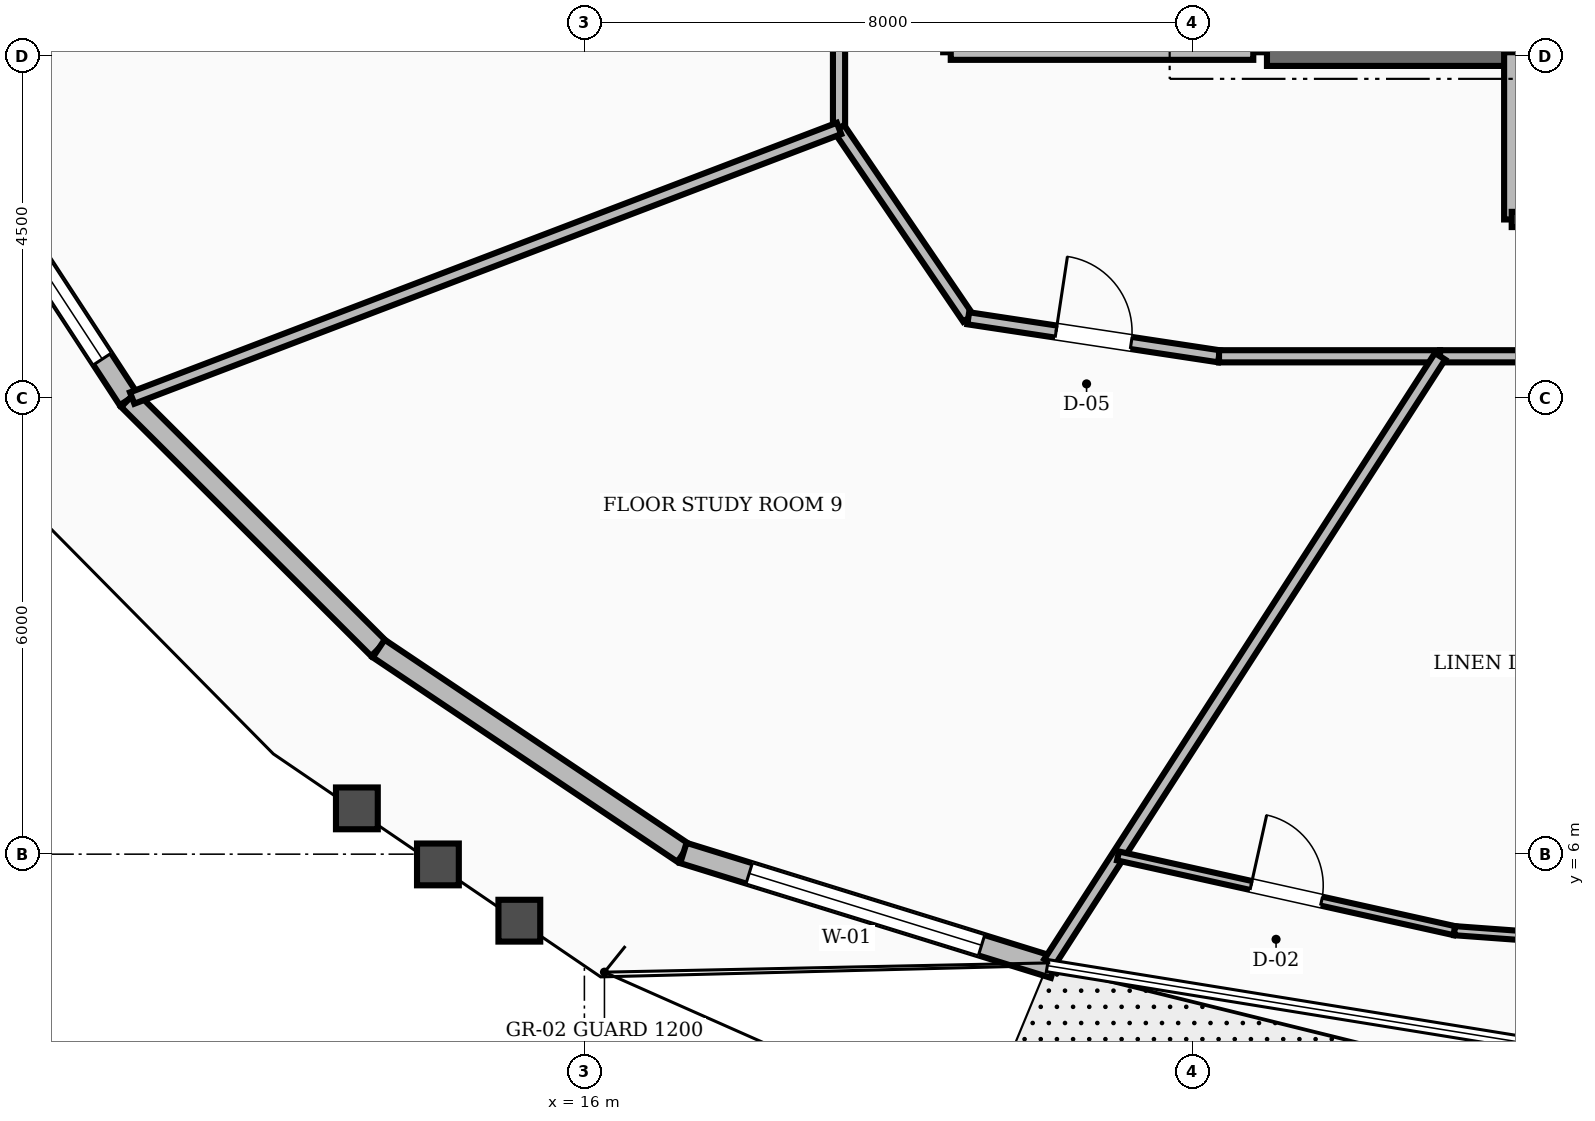
"""IFC4 building model, lengths in metres.
Left out: names, types, materials, properties, quantities, classifications, styles, units other than length and angle.
Written with IfcOpenShell. Run it as: python <this file> out.ifc"""

import sys

from ifc_helpers import new_model, si_unit, direction, frame, frame_2d, origin, place, context, subcontext, project, spatial, rectangle, extrude, element, fill, save


model = new_model("IFC4")
c1 = context("Model", 3, precision=1e-05, world=origin(), true_north=direction((0.0, 1.0)))
c2 = subcontext(c1, "Body", "Model", "MODEL_VIEW")
j1 = project(units=[si_unit("LENGTHUNIT", "METRE"), si_unit("PLANEANGLEUNIT", "RADIAN")], contexts=[c1])
p1 = place(None, origin())
s1 = spatial("IfcSite", under=j1, at=p1, CompositionType="ELEMENT")
p2 = place(p1, origin())
s2 = spatial("IfcBuilding", under=s1, at=p2, CompositionType="ELEMENT")
p3 = place(p2, frame((0.0, 0.0, 142.4)))
s3 = spatial("IfcBuildingStorey", under=s2, at=p3, CompositionType="ELEMENT", Elevation=142.4)
p4 = place(p3, frame((24.98, 16.55, 0.0), z_axis=(0.0, 0.0, 1.0), x_axis=(1.0, 0.0, 0.0)))
e1 = element("IfcWall", 1, at=p4, inside=s3, PredefinedType="SHEAR", context=c2, shape_type="SweptSolid", body=[
    extrude(rectangle(XDim=3.22, YDim=0.36, at=frame_2d((1.61, 0.0))), origin(), (0.0, 0.0, 1.0), 3.6),
])
p5 = place(p3, frame((7.559, 15.722, 0.0), z_axis=(0.0, 0.0, 1.0), x_axis=(0.547212555107, -0.836993679506, 0.0)))
e2 = element("IfcWall", 2, at=p5, inside=s3, PredefinedType="STANDARD", context=c2, shape_type="SweptSolid", body=[
    extrude(rectangle(XDim=4.468, YDim=0.28, at=frame_2d((2.234, 0.0))), origin(), (0.0, 0.0, 1.0), 2.82),
])
p6 = place(p5, frame((0.634, 0.0, 0.8)))
e3 = element("IfcOpeningElement", 3, at=p6, cuts=e2, PredefinedType="OPENING", context=c2, shape_type="SweptSolid", body=[
    extrude(rectangle(XDim=3.2, YDim=1.65, at=frame_2d((1.6, 0.825))), frame((0.0, 0.15, 0.0), z_axis=(0.0, -1.0, 0.0), x_axis=(1.0, 0.0, 0.0)), (0.0, 0.0, 1.0), 0.3),
])
p7 = place(p3, frame((10.004, 11.983, 0.0), z_axis=(0.0, 0.0, 1.0), x_axis=(0.708393596514, -0.705817619799, 0.0)))
e4 = element("IfcWall", 4, at=p7, inside=s3, PredefinedType="STANDARD", context=c2, shape_type="SweptSolid", body=[
    extrude(rectangle(XDim=4.644, YDim=0.28, at=frame_2d((2.322, 0.0))), origin(), (0.0, 0.0, 1.0), 2.82),
])
p8 = place(p3, frame((13.294, 8.705, 0.0), z_axis=(0.0, 0.0, 1.0), x_axis=(0.830381581739, -0.55719514419, 0.0)))
e5 = element("IfcWall", 5, at=p8, inside=s3, PredefinedType="STANDARD", context=c2, shape_type="SweptSolid", body=[
    extrude(rectangle(XDim=4.828, YDim=0.28, at=frame_2d((2.414, 0.0))), origin(), (0.0, 0.0, 1.0), 2.82),
])
p9 = place(p3, frame((17.302, 6.015, 0.0), z_axis=(0.0, 0.0, 1.0), x_axis=(0.955310335689, -0.295604740364, 0.0)))
e6 = element("IfcWall", 6, at=p9, inside=s3, PredefinedType="STANDARD", context=c2, shape_type="SweptSolid", body=[
    extrude(rectangle(XDim=5.104, YDim=0.28, at=frame_2d((2.552, 0.0))), origin(), (0.0, 0.0, 1.0), 2.82),
])
p10 = place(p9, frame((0.906, 0.0, 0.8)))
e7 = element("IfcOpeningElement", 7, at=p10, cuts=e6, PredefinedType="OPENING", context=c2, shape_type="SweptSolid", body=[
    extrude(rectangle(XDim=3.2, YDim=1.65, at=frame_2d((1.6, 0.825))), frame((0.0, 0.15, 0.0), z_axis=(0.0, -1.0, 0.0), x_axis=(1.0, 0.0, 0.0)), (0.0, 0.0, 1.0), 0.3),
])
p11 = place(p3, frame((20.82, 16.55, 0.0), z_axis=(0.0, 0.0, 1.0), x_axis=(1.0, 0.0, 0.0)))
e8 = element("IfcWall", 8, at=p11, inside=s3, PredefinedType="SOLIDWALL", context=c2, shape_type="SweptSolid", body=[
    extrude(rectangle(XDim=3.98, YDim=0.2, at=frame_2d((1.99, 0.0))), origin(), (0.0, 0.0, 1.0), 2.8),
])
p12 = place(p3, frame((28.2, 14.35, 0.0), z_axis=(0.0, 0.0, 1.0), x_axis=(0.0, 1.0, 0.0)))
e9 = element("IfcWall", 9, at=p12, inside=s3, PredefinedType="SOLIDWALL", context=c2, shape_type="SweptSolid", body=[
    extrude(rectangle(XDim=2.2, YDim=0.2, at=frame_2d((1.1, 0.0))), origin(), (0.0, 0.0, 1.0), 2.8),
])
p13 = place(p3, frame((28.2, 14.35, 0.0), z_axis=(0.0, 0.0, 1.0), x_axis=(1.0, 0.0, 0.0)))
e10 = element("IfcWall", 10, at=p13, inside=s3, PredefinedType="SOLIDWALL", context=c2, shape_type="SweptSolid", body=[
    extrude(rectangle(XDim=7.6, YDim=0.2, at=frame_2d((3.8, 0.0))), origin(), (0.0, 0.0, 1.0), 2.8),
])
p14 = place(p13, frame((3.2, 0.0, 0.0)))
e11 = element("IfcOpeningElement", 11, at=p14, cuts=e10, PredefinedType="OPENING", context=c2, shape_type="SweptSolid", body=[
    extrude(rectangle(XDim=1.2, YDim=2.1, at=frame_2d((0.6, 1.05))), frame((0.0, 0.11, 0.0), z_axis=(0.0, -1.0, 0.0), x_axis=(1.0, 0.0, 0.0)), (0.0, 0.0, 1.0), 0.22),
])
p15 = place(p3, frame((19.35, 18.76, 0.0), z_axis=(0.0, 0.0, 1.0), x_axis=(0.0, -1.0, 0.0)))
e12 = element("IfcWall", 12, at=p15, inside=s3, PredefinedType="SOLIDWALL", context=c2, shape_type="SweptSolid", body=[
    extrude(rectangle(XDim=3.213, YDim=0.16, at=frame_2d((1.606, 0.0))), origin(), (0.0, 0.0, 1.0), 2.8),
])
p16 = place(p3, frame((19.35, 15.548, 0.0), z_axis=(0.0, 0.0, 1.0), x_axis=(0.562674669208, -0.826678423955, 0.0)))
e13 = element("IfcWall", 13, at=p16, inside=s3, PredefinedType="SOLIDWALL", context=c2, shape_type="SweptSolid", body=[
    extrude(rectangle(XDim=3.021, YDim=0.16, at=frame_2d((1.511, 0.0))), origin(), (0.0, 0.0, 1.0), 2.8),
])
p17 = place(p3, frame((21.05, 13.05, 0.0), z_axis=(0.0, 0.0, 1.0), x_axis=(0.988710906508, -0.149835721217, 0.0)))
e14 = element("IfcWall", 14, at=p17, inside=s3, PredefinedType="SOLIDWALL", context=c2, shape_type="SweptSolid", body=[
    extrude(rectangle(XDim=3.337, YDim=0.16, at=frame_2d((1.668, 0.0))), origin(), (0.0, 0.0, 1.0), 2.8),
])
p18 = place(p17, frame((1.168, 0.0, 0.0)))
e15 = element("IfcOpeningElement", 15, at=p18, cuts=e14, PredefinedType="OPENING", context=c2, shape_type="SweptSolid", body=[
    extrude(rectangle(XDim=1.0, YDim=2.1, at=frame_2d((0.5, 1.05))), frame((0.0, 0.09, 0.0), z_axis=(0.0, -1.0, 0.0), x_axis=(1.0, 0.0, 0.0)), (0.0, 0.0, 1.0), 0.18),
])
p19 = place(p3, frame((24.349, 12.55, 0.0), z_axis=(0.0, 0.0, 1.0), x_axis=(1.0, 0.0, 0.0)))
e16 = element("IfcWall", 16, at=p19, inside=s3, PredefinedType="SOLIDWALL", context=c2, shape_type="SweptSolid", body=[
    extrude(rectangle(XDim=2.908, YDim=0.16, at=frame_2d((1.454, 0.0))), origin(), (0.0, 0.0, 1.0), 2.8),
])
p20 = place(p3, frame((27.257, 12.55, 0.0), z_axis=(0.0, 0.0, 1.0), x_axis=(1.0, 0.0, 0.0)))
e17 = element("IfcWall", 17, at=p20, inside=s3, PredefinedType="SOLIDWALL", context=c2, shape_type="SweptSolid", body=[
    extrude(rectangle(XDim=2.465, YDim=0.16, at=frame_2d((1.232, 0.0))), origin(), (0.0, 0.0, 1.0), 2.8),
])
p21 = place(p3, frame((19.35, 15.548, 0.0), z_axis=(0.0, 0.0, 1.0), x_axis=(-0.934339604952, -0.356383925871, 0.0)))
e18 = element("IfcWall", 18, at=p21, inside=s3, PredefinedType="SOLIDWALL", context=c2, shape_type="SweptSolid", body=[
    extrude(rectangle(XDim=9.953, YDim=0.16, at=frame_2d((4.977, 0.0))), origin(), (0.0, 0.0, 1.0), 2.8),
])
p22 = place(p3, frame((27.257, 12.55, 0.0), z_axis=(0.0, 0.0, 1.0), x_axis=(-0.541746991037, -0.840541609739, 0.0)))
e19 = element("IfcWall", 19, at=p22, inside=s3, PredefinedType="SOLIDWALL", context=c2, shape_type="SweptSolid", body=[
    extrude(rectangle(XDim=9.487, YDim=0.16, at=frame_2d((4.744, 0.0))), origin(), (0.0, 0.0, 1.0), 2.8),
])
p23 = place(p3, frame((23.021, 5.977, 0.0), z_axis=(0.0, 0.0, 1.0), x_axis=(0.976216186395, -0.216799348294, 0.0)))
e20 = element("IfcWall", 20, at=p23, inside=s3, PredefinedType="PARTITIONING", context=c2, shape_type="SweptSolid", body=[
    extrude(rectangle(XDim=4.535, YDim=0.12, at=frame_2d((2.268, 0.0))), origin(), (0.0, 0.0, 1.0), 2.8),
])
p24 = place(p23, frame((1.792, 0.0, 0.0)))
e21 = element("IfcOpeningElement", 21, at=p24, cuts=e20, PredefinedType="OPENING", context=c2, shape_type="SweptSolid", body=[
    extrude(rectangle(XDim=0.95, YDim=2.1, at=frame_2d((0.475, 1.05))), frame((0.0, 0.07, 0.0), z_axis=(0.0, -1.0, 0.0), x_axis=(1.0, 0.0, 0.0)), (0.0, 0.0, 1.0), 0.14),
])
p25 = place(p3, frame((27.448, 4.993, 0.0), z_axis=(0.0, 0.0, 1.0), x_axis=(0.99735088104, -0.072740773219, 0.0)))
e22 = element("IfcWall", 22, at=p25, inside=s3, PredefinedType="PARTITIONING", context=c2, shape_type="SweptSolid", body=[
    extrude(rectangle(XDim=4.565, YDim=0.12, at=frame_2d((2.282, 0.0))), origin(), (0.0, 0.0, 1.0), 2.8),
])
p26 = place(p6, origin())
e23 = element("IfcWindow", 23, at=p26, inside=s3, PartitioningType="SINGLE_PANEL", PredefinedType="WINDOW", context=c2, shape_type="SweptSolid", body=[
    extrude(rectangle(XDim=3.2, YDim=1.65, at=frame_2d((1.6, 0.825))), frame((0.0, 0.03, 0.0), z_axis=(0.0, -1.0, 0.0), x_axis=(1.0, 0.0, 0.0)), (0.0, 0.0, 1.0), 0.06),
])
fill(e3, e23)
p27 = place(p10, origin())
e24 = element("IfcWindow", 24, at=p27, inside=s3, PartitioningType="SINGLE_PANEL", PredefinedType="WINDOW", context=c2, shape_type="SweptSolid", body=[
    extrude(rectangle(XDim=3.2, YDim=1.65, at=frame_2d((1.6, 0.825))), frame((0.0, 0.03, 0.0), z_axis=(0.0, -1.0, 0.0), x_axis=(1.0, 0.0, 0.0)), (0.0, 0.0, 1.0), 0.06),
])
fill(e7, e24)
p28 = place(p18, origin())
e25 = element("IfcDoor", 25, at=p28, inside=s3, OperationType="SINGLE_SWING_LEFT", PredefinedType="DOOR", context=c2, shape_type="SweptSolid", body=[
    extrude(rectangle(XDim=1.0, YDim=2.1, at=frame_2d((0.5, 1.05))), frame((0.0, 0.025, 0.0), z_axis=(0.0, -1.0, 0.0), x_axis=(1.0, 0.0, 0.0)), (0.0, 0.0, 1.0), 0.05),
])
fill(e15, e25)
p29 = place(p24, origin())
e26 = element("IfcDoor", 26, at=p29, inside=s3, OperationType="SINGLE_SWING_LEFT", PredefinedType="DOOR", context=c2, shape_type="SweptSolid", body=[
    extrude(rectangle(XDim=0.95, YDim=2.1, at=frame_2d((0.475, 1.05))), frame((0.0, 0.025, 0.0), z_axis=(0.0, -1.0, 0.0), x_axis=(1.0, 0.0, 0.0)), (0.0, 0.0, 1.0), 0.05),
])
fill(e21, e26)
save(model, sys.argv[1])
